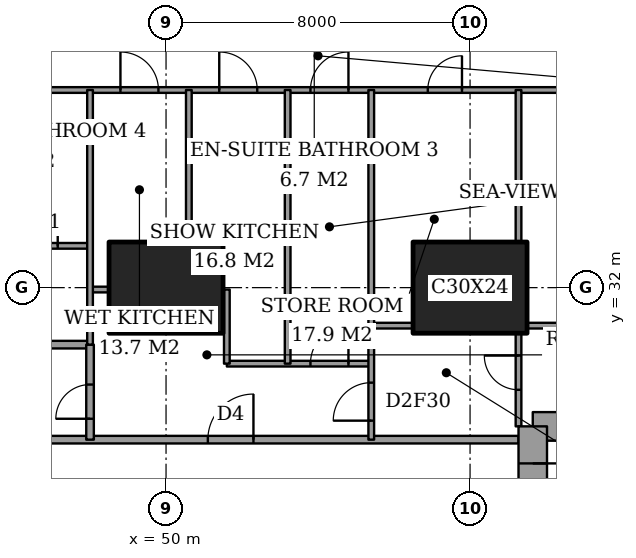
"""IFC4 building model, lengths in metres.
Left out: names, types, materials, properties, quantities, classifications, styles, units other than length and angle.
Written with IfcOpenShell. Run it as: python <this file> out.ifc"""

import sys

from ifc_helpers import new_model, si_unit, direction, frame, frame_2d, origin, origin_2d, place, context, subcontext, project, spatial, rectangle, extrude, element, fill, save


model = new_model("IFC4")
c1 = context("Model", 3, precision=1e-05, world=origin(), true_north=direction((0.0, 1.0)))
c2 = subcontext(c1, "Body", "Model", "MODEL_VIEW")
j1 = project(units=[si_unit("LENGTHUNIT", "METRE"), si_unit("PLANEANGLEUNIT", "RADIAN")], contexts=[c1])
p1 = place(None, origin())
s1 = spatial("IfcSite", under=j1, at=p1, CompositionType="ELEMENT")
p2 = place(p1, origin())
s2 = spatial("IfcBuilding", under=s1, at=p2, CompositionType="ELEMENT")
p3 = place(p2, frame((0.0, 0.0, 62.0)))
s3 = spatial("IfcBuildingStorey", under=s2, at=p3, CompositionType="ELEMENT", Elevation=62.0)
for number, where, z_axis, x_axis in (
    (1, (50.0, 32.0, 0.0), (0.0, 0.0, 1.0), (1.0, 0.0, 0.0)),
    (2, (58.0, 32.0, 0.0), (0.0, 0.0, 1.0), (1.0, 0.0, 0.0)),
):
    element("IfcColumn", number, at=place(p3, frame(where, z_axis=z_axis, x_axis=x_axis)), inside=s3, PredefinedType="COLUMN", context=c2, shape_type="SweptSolid", body=[
        extrude(rectangle(XDim=3.0, YDim=2.4, at=origin_2d()), origin(), (0.0, 0.0, 1.0), 3.6),
    ])
p4 = place(p3, frame((64.1, 28.35, 0.0), z_axis=(0.0, 0.0, 1.0), x_axis=(-1.0, 0.0, 0.0)))
e3 = element("IfcWall", 3, at=p4, inside=s3, PredefinedType="SHEAR", context=c2, shape_type="SweptSolid", body=[
    extrude(rectangle(XDim=4.45, YDim=0.75, at=frame_2d((2.225, 0.0))), origin(), (0.0, 0.0, 1.0), 3.6),
])
p5 = place(p3, frame((59.65, 28.35, 0.0), z_axis=(0.0, 0.0, 1.0), x_axis=(0.0, -1.0, 0.0)))
e4 = element("IfcWall", 4, at=p5, inside=s3, PredefinedType="SHEAR", context=c2, shape_type="SweptSolid", body=[
    extrude(rectangle(XDim=8.7, YDim=0.75, at=frame_2d((4.35, 0.0))), origin(), (0.0, 0.0, 1.0), 3.6),
])
p6 = place(p5, frame((0.975, 0.0, 0.0)))
e5 = element("IfcOpeningElement", 5, at=p6, cuts=e4, PredefinedType="OPENING", context=c2, shape_type="SweptSolid", body=[
    extrude(rectangle(XDim=1.0, YDim=2.1, at=frame_2d((0.5, 1.05))), frame((0.0, 0.385, 0.0), z_axis=(0.0, -1.0, 0.0), x_axis=(1.0, 0.0, 0.0)), (0.0, 0.0, 1.0), 0.77),
])
p7 = place(p3, frame((42.0, 28.0, 0.0), z_axis=(0.0, 0.0, 1.0), x_axis=(1.0, 0.0, 0.0)))
e6 = element("IfcWall", 6, at=p7, inside=s3, PredefinedType="PARTITIONING", context=c2, shape_type="SweptSolid", body=[
    extrude(rectangle(XDim=17.275, YDim=0.2, at=frame_2d((8.637, 0.0))), origin(), (0.0, 0.0, 1.0), 3.35),
])
p8 = place(p7, frame((9.1, 0.0, 0.0)))
e7 = element("IfcOpeningElement", 7, at=p8, cuts=e6, PredefinedType="OPENING", context=c2, shape_type="SweptSolid", body=[
    extrude(rectangle(XDim=1.2, YDim=2.4, at=frame_2d((0.6, 1.2))), frame((0.0, 0.11, 0.0), z_axis=(0.0, -1.0, 0.0), x_axis=(1.0, 0.0, 0.0)), (0.0, 0.0, 1.0), 0.22),
])
p9 = place(p3, frame((51.6, 30.0, 0.0), z_axis=(0.0, 0.0, 1.0), x_axis=(1.0, 0.0, 0.0)))
e8 = element("IfcWall", 8, at=p9, inside=s3, PredefinedType="PARTITIONING", context=c2, shape_type="SweptSolid", body=[
    extrude(rectangle(XDim=3.8, YDim=0.15, at=frame_2d((1.9, 0.0))), origin(), (0.0, 0.0, 1.0), 3.35),
])
p10 = place(p9, frame((2.2, 0.0, 0.0)))
e9 = element("IfcOpeningElement", 9, at=p10, cuts=e8, PredefinedType="OPENING", context=c2, shape_type="SweptSolid", body=[
    extrude(rectangle(XDim=1.0, YDim=2.1, at=frame_2d((0.5, 1.05))), frame((0.0, 0.085, 0.0), z_axis=(0.0, -1.0, 0.0), x_axis=(1.0, 0.0, 0.0)), (0.0, 0.0, 1.0), 0.17),
])
p11 = place(p3, frame((42.0, 30.5, 0.0), z_axis=(0.0, 0.0, 1.0), x_axis=(1.0, 0.0, 0.0)))
e10 = element("IfcWall", 10, at=p11, inside=s3, PredefinedType="PARTITIONING", context=c2, shape_type="SweptSolid", body=[
    extrude(rectangle(XDim=6.0, YDim=0.2, at=frame_2d((3.0, 0.0))), origin(), (0.0, 0.0, 1.0), 3.35),
])
p12 = place(p3, frame((55.4, 31.0, 0.0), z_axis=(0.0, 0.0, 1.0), x_axis=(1.0, 0.0, 0.0)))
e11 = element("IfcWall", 11, at=p12, inside=s3, PredefinedType="PARTITIONING", context=c2, shape_type="SweptSolid", body=[
    extrude(rectangle(XDim=1.1, YDim=0.15, at=frame_2d((0.55, 0.0))), origin(), (0.0, 0.0, 1.0), 3.35),
])
p13 = place(p3, frame((59.5, 31.0, 0.0), z_axis=(0.0, 0.0, 1.0), x_axis=(1.0, 0.0, 0.0)))
e12 = element("IfcWall", 12, at=p13, inside=s3, PredefinedType="PARTITIONING", context=c2, shape_type="SweptSolid", body=[
    extrude(rectangle(XDim=5.15, YDim=0.15, at=frame_2d((2.575, 0.0))), origin(), (0.0, 0.0, 1.0), 3.35),
])
p14 = place(p3, frame((48.0, 31.95, 0.0), z_axis=(0.0, 0.0, 1.0), x_axis=(1.0, 0.0, 0.0)))
e13 = element("IfcWall", 13, at=p14, inside=s3, PredefinedType="PARTITIONING", context=c2, shape_type="SweptSolid", body=[
    extrude(rectangle(XDim=0.5, YDim=0.15, at=frame_2d((0.25, 0.0))), origin(), (0.0, 0.0, 1.0), 2.634),
])
p15 = place(p3, frame((45.4, 33.1, 0.0), z_axis=(0.0, 0.0, 1.0), x_axis=(1.0, 0.0, 0.0)))
e14 = element("IfcWall", 14, at=p15, inside=s3, PredefinedType="PARTITIONING", context=c2, shape_type="SweptSolid", body=[
    extrude(rectangle(XDim=2.6, YDim=0.15, at=frame_2d((1.3, 0.0))), origin(), (0.0, 0.0, 1.0), 3.35),
])
p16 = place(p15, frame((0.85, 0.0, 0.0)))
e15 = element("IfcOpeningElement", 15, at=p16, cuts=e14, PredefinedType="OPENING", context=c2, shape_type="SweptSolid", body=[
    extrude(rectangle(XDim=0.9, YDim=2.1, at=frame_2d((0.45, 1.05))), frame((0.0, 0.085, 0.0), z_axis=(0.0, -1.0, 0.0), x_axis=(1.0, 0.0, 0.0)), (0.0, 0.0, 1.0), 0.17),
])
p17 = place(p3, frame((41.439, 37.2, 0.0), z_axis=(0.0, 0.0, 1.0), x_axis=(1.0, 0.0, 0.0)))
e16 = element("IfcWall", 16, at=p17, inside=s3, PredefinedType="PARTITIONING", context=c2, shape_type="SweptSolid", body=[
    extrude(rectangle(XDim=25.011, YDim=0.15, at=frame_2d((12.505, 0.0))), origin(), (0.0, 0.0, 1.0), 3.35),
])
p18 = place(p17, frame((12.361, 0.0, 0.0)))
e17 = element("IfcOpeningElement", 17, at=p18, cuts=e16, PredefinedType="OPENING", context=c2, shape_type="SweptSolid", body=[
    extrude(rectangle(XDim=1.0, YDim=2.1, at=frame_2d((0.5, 1.05))), frame((0.0, 0.085, 0.0), z_axis=(0.0, -1.0, 0.0), x_axis=(1.0, 0.0, 0.0)), (0.0, 0.0, 1.0), 0.17),
])
p19 = place(p17, frame((20.924, 0.0, 0.0)))
e18 = element("IfcOpeningElement", 18, at=p19, cuts=e16, PredefinedType="OPENING", context=c2, shape_type="SweptSolid", body=[
    extrude(rectangle(XDim=1.0, YDim=2.1, at=frame_2d((0.5, 1.05))), frame((0.0, 0.085, 0.0), z_axis=(0.0, -1.0, 0.0), x_axis=(1.0, 0.0, 0.0)), (0.0, 0.0, 1.0), 0.17),
])
p20 = place(p17, frame((15.448, 0.0, 0.0)))
e19 = element("IfcOpeningElement", 19, at=p20, cuts=e16, PredefinedType="OPENING", context=c2, shape_type="SweptSolid", body=[
    extrude(rectangle(XDim=0.9, YDim=2.1, at=frame_2d((0.45, 1.05))), frame((0.0, 0.085, 0.0), z_axis=(0.0, -1.0, 0.0), x_axis=(1.0, 0.0, 0.0)), (0.0, 0.0, 1.0), 0.17),
])
p21 = place(p17, frame((9.961, 0.0, 0.0)))
e20 = element("IfcOpeningElement", 20, at=p21, cuts=e16, PredefinedType="OPENING", context=c2, shape_type="SweptSolid", body=[
    extrude(rectangle(XDim=1.0, YDim=2.1, at=frame_2d((0.5, 1.05))), frame((0.0, 0.085, 0.0), z_axis=(0.0, -1.0, 0.0), x_axis=(1.0, 0.0, 0.0)), (0.0, 0.0, 1.0), 0.17),
])
p22 = place(p17, frame((7.361, 0.0, 0.0)))
e21 = element("IfcOpeningElement", 21, at=p22, cuts=e16, PredefinedType="OPENING", context=c2, shape_type="SweptSolid", body=[
    extrude(rectangle(XDim=1.0, YDim=2.1, at=frame_2d((0.5, 1.05))), frame((0.0, 0.085, 0.0), z_axis=(0.0, -1.0, 0.0), x_axis=(1.0, 0.0, 0.0)), (0.0, 0.0, 1.0), 0.17),
])
p23 = place(p17, frame((2.836, 0.0, 0.0)))
e22 = element("IfcOpeningElement", 22, at=p23, cuts=e16, PredefinedType="OPENING", context=c2, shape_type="SweptSolid", body=[
    extrude(rectangle(XDim=1.0, YDim=2.1, at=frame_2d((0.5, 1.05))), frame((0.0, 0.085, 0.0), z_axis=(0.0, -1.0, 0.0), x_axis=(1.0, 0.0, 0.0)), (0.0, 0.0, 1.0), 0.17),
])
p24 = place(p3, frame((48.0, 28.0, 0.0), z_axis=(0.0, 0.0, 1.0), x_axis=(0.0, 1.0, 0.0)))
e23 = element("IfcWall", 23, at=p24, inside=s3, PredefinedType="PARTITIONING", context=c2, shape_type="SweptSolid", body=[
    extrude(rectangle(XDim=2.5, YDim=0.2, at=frame_2d((1.25, 0.0))), origin(), (0.0, 0.0, 1.0), 3.35),
])
p25 = place(p24, frame((0.55, 0.0, 0.0)))
e24 = element("IfcOpeningElement", 24, at=p25, cuts=e23, PredefinedType="OPENING", context=c2, shape_type="SweptSolid", body=[
    extrude(rectangle(XDim=0.9, YDim=2.1, at=frame_2d((0.45, 1.05))), frame((0.0, 0.11, 0.0), z_axis=(0.0, -1.0, 0.0), x_axis=(1.0, 0.0, 0.0)), (0.0, 0.0, 1.0), 0.22),
])
p26 = place(p3, frame((48.0, 30.5, 0.0), z_axis=(0.0, 0.0, 1.0), x_axis=(0.0, 1.0, 0.0)))
e25 = element("IfcWall", 25, at=p26, inside=s3, PredefinedType="PARTITIONING", context=c2, shape_type="SweptSolid", body=[
    extrude(rectangle(XDim=6.7, YDim=0.15, at=frame_2d((3.35, 0.0))), origin(), (0.0, 0.0, 1.0), 3.35),
])
p27 = place(p3, frame((50.6, 33.2, 0.0), z_axis=(0.0, 0.0, 1.0), x_axis=(0.0, 1.0, 0.0)))
e26 = element("IfcWall", 26, at=p27, inside=s3, PredefinedType="PARTITIONING", context=c2, shape_type="SweptSolid", body=[
    extrude(rectangle(XDim=4.0, YDim=0.15, at=frame_2d((2.0, 0.0))), origin(), (0.0, 0.0, 1.0), 3.35),
])
p28 = place(p3, frame((51.6, 30.0, 0.0), z_axis=(0.0, 0.0, 1.0), x_axis=(0.0, 1.0, 0.0)))
e27 = element("IfcWall", 27, at=p28, inside=s3, PredefinedType="PARTITIONING", context=c2, shape_type="SweptSolid", body=[
    extrude(rectangle(XDim=1.95, YDim=0.15, at=frame_2d((0.975, 0.0))), origin(), (0.0, 0.0, 1.0), 3.35),
])
p29 = place(p3, frame((53.2, 30.0, 0.0), z_axis=(0.0, 0.0, 1.0), x_axis=(0.0, 1.0, 0.0)))
e28 = element("IfcWall", 28, at=p29, inside=s3, PredefinedType="PARTITIONING", context=c2, shape_type="SweptSolid", body=[
    extrude(rectangle(XDim=7.2, YDim=0.15, at=frame_2d((3.6, 0.0))), origin(), (0.0, 0.0, 1.0), 3.35),
])
p30 = place(p3, frame((55.4, 28.0, 0.0), z_axis=(0.0, 0.0, 1.0), x_axis=(0.0, 1.0, 0.0)))
e29 = element("IfcWall", 29, at=p30, inside=s3, PredefinedType="PARTITIONING", context=c2, shape_type="SweptSolid", body=[
    extrude(rectangle(XDim=9.2, YDim=0.15, at=frame_2d((4.6, 0.0))), origin(), (0.0, 0.0, 1.0), 3.35),
])
p31 = place(p30, frame((0.5, 0.0, 0.0)))
e30 = element("IfcOpeningElement", 30, at=p31, cuts=e29, PredefinedType="OPENING", context=c2, shape_type="SweptSolid", body=[
    extrude(rectangle(XDim=1.0, YDim=2.1, at=frame_2d((0.5, 1.05))), frame((0.0, 0.085, 0.0), z_axis=(0.0, -1.0, 0.0), x_axis=(1.0, 0.0, 0.0)), (0.0, 0.0, 1.0), 0.17),
])
p32 = place(p3, frame((59.275, 28.35, 0.0), z_axis=(0.0, 0.0, 1.0), x_axis=(0.0, 1.0, 0.0)))
e31 = element("IfcWall", 31, at=p32, inside=s3, PredefinedType="PARTITIONING", context=c2, shape_type="SweptSolid", body=[
    extrude(rectangle(XDim=2.45, YDim=0.15, at=frame_2d((1.225, 0.0))), origin(), (0.0, 0.0, 1.0), 3.35),
])
p33 = place(p32, frame((0.962, 0.0, 0.0)))
e32 = element("IfcOpeningElement", 32, at=p33, cuts=e31, PredefinedType="OPENING", context=c2, shape_type="SweptSolid", body=[
    extrude(rectangle(XDim=0.9, YDim=2.1, at=frame_2d((0.45, 1.05))), frame((0.0, 0.085, 0.0), z_axis=(0.0, -1.0, 0.0), x_axis=(1.0, 0.0, 0.0)), (0.0, 0.0, 1.0), 0.17),
])
p34 = place(p3, frame((59.275, 33.2, 0.0), z_axis=(0.0, 0.0, 1.0), x_axis=(0.0, 1.0, 0.0)))
e33 = element("IfcWall", 33, at=p34, inside=s3, PredefinedType="PARTITIONING", context=c2, shape_type="SweptSolid", body=[
    extrude(rectangle(XDim=4.0, YDim=0.15, at=frame_2d((2.0, 0.0))), origin(), (0.0, 0.0, 1.0), 3.35),
])
p35 = place(p18, origin())
e34 = element("IfcDoor", 34, at=p35, inside=s3, OperationType="SINGLE_SWING_LEFT", PredefinedType="DOOR", context=c2, shape_type="SweptSolid", body=[
    extrude(rectangle(XDim=1.0, YDim=2.1, at=frame_2d((0.5, 1.05))), frame((0.0, 0.025, 0.0), z_axis=(0.0, -1.0, 0.0), x_axis=(1.0, 0.0, 0.0)), (0.0, 0.0, 1.0), 0.05),
])
fill(e17, e34)
p36 = place(p33, origin())
e35 = element("IfcDoor", 35, at=p36, inside=s3, OperationType="SINGLE_SWING_LEFT", PredefinedType="DOOR", context=c2, shape_type="SweptSolid", body=[
    extrude(rectangle(XDim=0.9, YDim=2.1, at=frame_2d((0.45, 1.05))), frame((0.0, 0.025, 0.0), z_axis=(0.0, -1.0, 0.0), x_axis=(1.0, 0.0, 0.0)), (0.0, 0.0, 1.0), 0.05),
])
fill(e32, e35)
p37 = place(p20, origin())
e36 = element("IfcDoor", 36, at=p37, inside=s3, OperationType="SINGLE_SWING_LEFT", PredefinedType="DOOR", context=c2, shape_type="SweptSolid", body=[
    extrude(rectangle(XDim=0.9, YDim=2.1, at=frame_2d((0.45, 1.05))), frame((0.0, 0.025, 0.0), z_axis=(0.0, -1.0, 0.0), x_axis=(1.0, 0.0, 0.0)), (0.0, 0.0, 1.0), 0.05),
])
fill(e19, e36)
p38 = place(p31, origin())
e37 = element("IfcDoor", 37, at=p38, inside=s3, OperationType="SINGLE_SWING_RIGHT", PredefinedType="DOOR", context=c2, shape_type="SweptSolid", body=[
    extrude(rectangle(XDim=1.0, YDim=2.1, at=frame_2d((0.5, 1.05))), frame((0.0, 0.025, 0.0), z_axis=(0.0, -1.0, 0.0), x_axis=(1.0, 0.0, 0.0)), (0.0, 0.0, 1.0), 0.05),
])
fill(e30, e37)
p39 = place(p8, origin())
e38 = element("IfcDoor", 38, at=p39, inside=s3, OperationType="SINGLE_SWING_LEFT", PredefinedType="DOOR", context=c2, shape_type="SweptSolid", body=[
    extrude(rectangle(XDim=1.2, YDim=2.4, at=frame_2d((0.6, 1.2))), frame((0.0, 0.025, 0.0), z_axis=(0.0, -1.0, 0.0), x_axis=(1.0, 0.0, 0.0)), (0.0, 0.0, 1.0), 0.05),
])
fill(e7, e38)
p40 = place(p10, origin())
e39 = element("IfcDoor", 39, at=p40, inside=s3, OperationType="SINGLE_SWING_LEFT", PredefinedType="DOOR", context=c2, shape_type="SweptSolid", body=[
    extrude(rectangle(XDim=1.0, YDim=2.1, at=frame_2d((0.5, 1.05))), frame((0.0, 0.025, 0.0), z_axis=(0.0, -1.0, 0.0), x_axis=(1.0, 0.0, 0.0)), (0.0, 0.0, 1.0), 0.05),
])
fill(e9, e39)
p41 = place(p21, origin())
e40 = element("IfcDoor", 40, at=p41, inside=s3, OperationType="SINGLE_SWING_RIGHT", PredefinedType="DOOR", context=c2, shape_type="SweptSolid", body=[
    extrude(rectangle(XDim=1.0, YDim=2.1, at=frame_2d((0.5, 1.05))), frame((0.0, 0.025, 0.0), z_axis=(0.0, -1.0, 0.0), x_axis=(1.0, 0.0, 0.0)), (0.0, 0.0, 1.0), 0.05),
])
fill(e20, e40)
p42 = place(p22, origin())
e41 = element("IfcDoor", 41, at=p42, inside=s3, OperationType="SINGLE_SWING_RIGHT", PredefinedType="DOOR", context=c2, shape_type="SweptSolid", body=[
    extrude(rectangle(XDim=1.0, YDim=2.1, at=frame_2d((0.5, 1.05))), frame((0.0, 0.025, 0.0), z_axis=(0.0, -1.0, 0.0), x_axis=(1.0, 0.0, 0.0)), (0.0, 0.0, 1.0), 0.05),
])
fill(e21, e41)
p43 = place(p16, origin())
e42 = element("IfcDoor", 42, at=p43, inside=s3, OperationType="SINGLE_SWING_LEFT", PredefinedType="DOOR", context=c2, shape_type="SweptSolid", body=[
    extrude(rectangle(XDim=0.9, YDim=2.1, at=frame_2d((0.45, 1.05))), frame((0.0, 0.025, 0.0), z_axis=(0.0, -1.0, 0.0), x_axis=(1.0, 0.0, 0.0)), (0.0, 0.0, 1.0), 0.05),
])
fill(e15, e42)
p44 = place(p25, origin())
e43 = element("IfcDoor", 43, at=p44, inside=s3, OperationType="SINGLE_SWING_RIGHT", PredefinedType="DOOR", context=c2, shape_type="SweptSolid", body=[
    extrude(rectangle(XDim=0.9, YDim=2.1, at=frame_2d((0.45, 1.05))), frame((0.0, 0.025, 0.0), z_axis=(0.0, -1.0, 0.0), x_axis=(1.0, 0.0, 0.0)), (0.0, 0.0, 1.0), 0.05),
])
fill(e24, e43)
p45 = place(p6, origin())
e44 = element("IfcDoor", 44, at=p45, inside=s3, OperationType="SINGLE_SWING_RIGHT", PredefinedType="DOOR", context=c2, shape_type="SweptSolid", body=[
    extrude(rectangle(XDim=1.0, YDim=2.1, at=frame_2d((0.5, 1.05))), frame((0.0, 0.025, 0.0), z_axis=(0.0, -1.0, 0.0), x_axis=(1.0, 0.0, 0.0)), (0.0, 0.0, 1.0), 0.05),
])
fill(e5, e44)
save(model, sys.argv[1])
